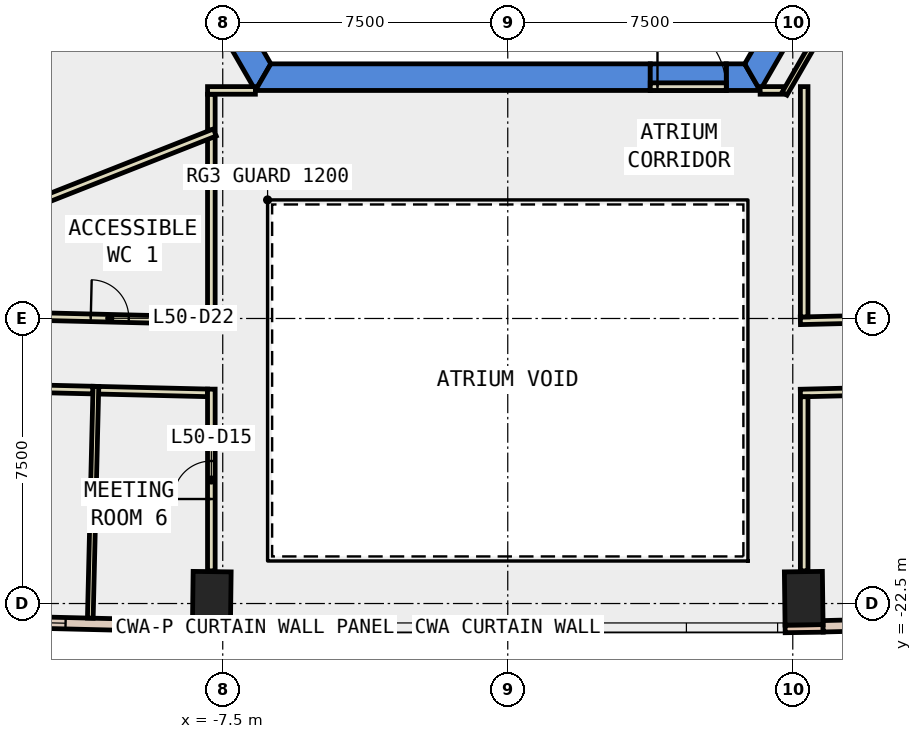
"""IFC4 building model, lengths in metres.
Left out: names, types, materials, properties, quantities, classifications, styles, units other than length and angle.
Written with IfcOpenShell. Run it as: python <this file> out.ifc"""

import sys

from ifc_helpers import new_model, si_unit, direction, frame, frame_2d, origin, origin_2d, place, context, subcontext, project, spatial, polyline, rectangle, outline, extrude, element, fill, save


model = new_model("IFC4")
c1 = context("Model", 3, precision=1e-05, world=origin(), true_north=direction((0.0, 1.0)))
c2 = subcontext(c1, "Body", "Model", "MODEL_VIEW")
j1 = project(units=[si_unit("LENGTHUNIT", "METRE"), si_unit("PLANEANGLEUNIT", "RADIAN")], contexts=[c1])
p1 = place(None, origin())
s1 = spatial("IfcSite", under=j1, at=p1, CompositionType="ELEMENT")
p2 = place(p1, origin())
s2 = spatial("IfcBuilding", under=s1, at=p2, CompositionType="ELEMENT")
p3 = place(p2, frame((0.0, 0.0, 223.4)))
s3 = spatial("IfcBuildingStorey", under=s2, at=p3, CompositionType="ELEMENT", Elevation=223.4)
for number, where, z_axis, x_axis in (
    (1, (-7.788, -22.361, -0.4), (0.0, 0.0, 1.0), (-1.0, 0.013, 0.0)),
    (2, (7.788, -22.361, -0.4), (0.0, 0.0, 1.0), (1.0, 0.013, 0.0)),
):
    element("IfcColumn", number, at=place(p3, frame(where, z_axis=z_axis, x_axis=x_axis)), inside=s3, PredefinedType="COLUMN", context=c2, shape_type="SweptSolid", body=[
        extrude(rectangle(XDim=1.0, YDim=1.4, at=origin_2d()), origin(), (0.0, 0.0, 1.0), 4.2),
    ])
p4 = place(p3, frame((0.0, 0.0, -0.4)))
e3 = element("IfcWall", 3, at=p4, inside=s3, PredefinedType="SHEAR", context=c2, shape_type="SweptSolid", body=[
    extrude(outline(polyline([(-13.279, 2.5), (-6.64, -9.0), (-6.235, -8.3), (-12.471, 2.5), (-13.279, 2.5)])), origin(), (0.0, 0.0, 1.0), 4.2),
])
p5 = place(p3, frame((0.0, 0.0, -0.4)))
e4 = element("IfcWall", 4, at=p5, inside=s3, PredefinedType="SHEAR", context=c2, shape_type="SweptSolid", body=[
    extrude(outline(polyline([(3.75, -9.0), (3.75, -8.3), (-6.235, -8.3), (-6.64, -9.0), (3.75, -9.0)])), origin(), (0.0, 0.0, 1.0), 4.2),
])
p6 = place(p3, frame((0.0, 0.0, -0.4)))
e5 = element("IfcWall", 5, at=p6, inside=s3, PredefinedType="SHEAR", context=c2, shape_type="SweptSolid", body=[
    extrude(outline(polyline([(5.75, -8.3), (5.75, -9.0), (6.64, -9.0), (6.235, -8.3), (5.75, -8.3)])), origin(), (0.0, 0.0, 1.0), 4.2),
])
p7 = place(p3, frame((0.0, 0.0, 3.6)))
e6 = element("IfcWall", 6, at=p7, inside=s3, PredefinedType="SHEAR", context=c2, shape_type="SweptSolid", body=[
    extrude(outline(polyline([(5.75, -9.0), (5.75, -8.3), (3.75, -8.3), (3.75, -9.0), (5.75, -9.0)])), origin(), (0.0, 0.0, 1.0), 0.2),
])
p8 = place(p3, frame((0.0, 0.0, -0.4)))
e7 = element("IfcWall", 7, at=p8, inside=s3, PredefinedType="SHEAR", context=c2, shape_type="SweptSolid", body=[
    extrude(outline(polyline([(6.64, -9.0), (13.279, 2.5), (12.471, 2.5), (6.235, -8.3), (6.64, -9.0)])), origin(), (0.0, 0.0, 1.0), 4.2),
])
for number, where, z_axis, x_axis in (
    (8, (8.877, -5.125, -0.4), (0.0, 0.0, 1.0), (0.866, -0.5, 0.0)),
    (9, (-8.877, -5.125, -0.4), (0.0, 0.0, 1.0), (-0.866, -0.5, 0.0)),
):
    element("IfcWall", number, at=place(p3, frame(where, z_axis=z_axis, x_axis=x_axis)), inside=s3, PredefinedType="SHEAR", context=c2, shape_type="SweptSolid", body=[
        extrude(rectangle(XDim=9.0, YDim=0.8, at=frame_2d((4.5, 0.0))), origin(), (0.0, 0.0, 1.0), 4.2),
    ])
for number, where, z_axis, x_axis in (
    (10, (-8.299, -23.154, 0.0), (0.0, 0.0, 1.0), (1.0, -0.014, 0.0)),
    (11, (7.299, -23.168, 0.0), (0.0, 0.0, 1.0), (1.0, 0.014, 0.0)),
):
    element("IfcWall", number, at=place(p3, frame(where, z_axis=z_axis, x_axis=x_axis)), inside=s3, PredefinedType="STANDARD", context=c2, shape_type="SweptSolid", body=[
        extrude(rectangle(XDim=1.0, YDim=0.2, at=frame_2d((0.5, 0.0))), origin(), (0.0, 0.0, 1.0), 3.8),
    ])
p9 = place(p3, frame((-13.681, -22.969, 0.0), z_axis=(0.0, 0.0, 1.0), x_axis=(0.999708030006, -0.024163086341, 0.0)))
e12 = element("IfcWall", 12, at=p9, inside=s3, PredefinedType="STANDARD", context=c2, shape_type="SweptSolid", body=[
    extrude(rectangle(XDim=5.385, YDim=0.3, at=frame_2d((2.693, 0.0))), origin(), (0.0, 0.0, 1.0), 3.8),
])
p10 = place(p9, frame((0.646, 0.0, 0.9)))
e13 = element("IfcOpeningElement", 13, at=p10, cuts=e12, PredefinedType="OPENING", context=c2, shape_type="SweptSolid", body=[
    extrude(rectangle(XDim=1.4, YDim=2.6, at=frame_2d((0.7, 1.3))), frame((0.0, 0.16, 0.0), z_axis=(0.0, -1.0, 0.0), x_axis=(1.0, 0.0, 0.0)), (0.0, 0.0, 1.0), 0.32),
])
p11 = place(p9, frame((3.339, 0.0, 0.9)))
e14 = element("IfcOpeningElement", 14, at=p11, cuts=e12, PredefinedType="OPENING", context=c2, shape_type="SweptSolid", body=[
    extrude(rectangle(XDim=1.4, YDim=2.6, at=frame_2d((0.7, 1.3))), frame((0.0, 0.16, 0.0), z_axis=(0.0, -1.0, 0.0), x_axis=(1.0, 0.0, 0.0)), (0.0, 0.0, 1.0), 0.32),
])
p12 = place(p3, frame((8.297, -23.099, 0.0), z_axis=(0.0, 0.0, 1.0), x_axis=(0.999708030006, 0.024163086341, 0.0)))
e15 = element("IfcWall", 15, at=p12, inside=s3, PredefinedType="STANDARD", context=c2, shape_type="SweptSolid", body=[
    extrude(rectangle(XDim=5.385, YDim=0.3, at=frame_2d((2.693, 0.0))), origin(), (0.0, 0.0, 1.0), 3.8),
])
p13 = place(p12, frame((0.646, 0.0, 0.9)))
e16 = element("IfcOpeningElement", 16, at=p13, cuts=e15, PredefinedType="OPENING", context=c2, shape_type="SweptSolid", body=[
    extrude(rectangle(XDim=1.4, YDim=2.6, at=frame_2d((0.7, 1.3))), frame((0.0, 0.16, 0.0), z_axis=(0.0, -1.0, 0.0), x_axis=(1.0, 0.0, 0.0)), (0.0, 0.0, 1.0), 0.32),
])
p14 = place(p12, frame((3.339, 0.0, 0.9)))
e17 = element("IfcOpeningElement", 17, at=p14, cuts=e15, PredefinedType="OPENING", context=c2, shape_type="SweptSolid", body=[
    extrude(rectangle(XDim=1.4, YDim=2.6, at=frame_2d((0.7, 1.3))), frame((0.0, 0.16, 0.0), z_axis=(0.0, -1.0, 0.0), x_axis=(1.0, 0.0, 0.0)), (0.0, 0.0, 1.0), 0.32),
])
p15 = place(p3, frame((7.7, -15.061, 0.0), z_axis=(0.0, 0.0, 1.0), x_axis=(0.999709615165, 0.024097413707, 0.0)))
e18 = element("IfcWall", 18, at=p15, inside=s3, PredefinedType="PARTITIONING", context=c2, shape_type="SweptSolid", body=[
    extrude(rectangle(XDim=6.231, YDim=0.2, at=frame_2d((3.115, 0.0))), origin(), (0.0, 0.0, 1.0), 3.8),
])
p16 = place(p15, frame((2.615, 0.0, 0.0)))
e19 = element("IfcOpeningElement", 19, at=p16, cuts=e18, PredefinedType="OPENING", context=c2, shape_type="SweptSolid", body=[
    extrude(rectangle(XDim=1.0, YDim=2.1, at=frame_2d((0.5, 1.05))), frame((0.0, 0.11, 0.0), z_axis=(0.0, -1.0, 0.0), x_axis=(1.0, 0.0, 0.0)), (0.0, 0.0, 1.0), 0.22),
])
p17 = place(p3, frame((-13.246, -14.927, 0.0), z_axis=(0.0, 0.0, 1.0), x_axis=(0.999708107757, -0.024159869312, 0.0)))
e20 = element("IfcWall", 20, at=p17, inside=s3, PredefinedType="PARTITIONING", context=c2, shape_type="SweptSolid", body=[
    extrude(rectangle(XDim=5.548, YDim=0.2, at=frame_2d((2.774, 0.0))), origin(), (0.0, 0.0, 1.0), 3.8),
])
p18 = place(p17, frame((2.274, 0.0, 0.0)))
e21 = element("IfcOpeningElement", 21, at=p18, cuts=e20, PredefinedType="OPENING", context=c2, shape_type="SweptSolid", body=[
    extrude(rectangle(XDim=1.0, YDim=2.1, at=frame_2d((0.5, 1.05))), frame((0.0, 0.11, 0.0), z_axis=(0.0, -1.0, 0.0), x_axis=(1.0, 0.0, 0.0)), (0.0, 0.0, 1.0), 0.22),
])
p19 = place(p3, frame((14.063, -16.808, 0.0), z_axis=(0.0, 0.0, 1.0), x_axis=(-0.999707980382, -0.024165139379, 0.0)))
e22 = element("IfcWall", 22, at=p19, inside=s3, PredefinedType="PARTITIONING", context=c2, shape_type="SweptSolid", body=[
    extrude(rectangle(XDim=6.365, YDim=0.2, at=frame_2d((3.183, 0.0))), origin(), (0.0, 0.0, 1.0), 3.8),
])
p20 = place(p19, frame((2.683, 0.0, 0.0)))
e23 = element("IfcOpeningElement", 23, at=p20, cuts=e22, PredefinedType="OPENING", context=c2, shape_type="SweptSolid", body=[
    extrude(rectangle(XDim=1.0, YDim=2.1, at=frame_2d((0.5, 1.05))), frame((0.0, 0.11, 0.0), z_axis=(0.0, -1.0, 0.0), x_axis=(1.0, 0.0, 0.0)), (0.0, 0.0, 1.0), 0.22),
])
p21 = place(p3, frame((-10.915, -16.884, 0.0), z_axis=(0.0, 0.0, 1.0), x_axis=(-0.999710384303, 0.024065483947, 0.0)))
e24 = element("IfcWall", 24, at=p21, inside=s3, PredefinedType="PARTITIONING", context=c2, shape_type="SweptSolid", body=[
    extrude(rectangle(XDim=3.074, YDim=0.2, at=frame_2d((1.537, 0.0))), origin(), (0.0, 0.0, 1.0), 3.8),
])
p22 = place(p3, frame((-7.9, -16.957, 0.0), z_axis=(0.0, 0.0, 1.0), x_axis=(-0.999709338637, 0.024108883071, 0.0)))
e25 = element("IfcWall", 25, at=p22, inside=s3, PredefinedType="PARTITIONING", context=c2, shape_type="SweptSolid", body=[
    extrude(rectangle(XDim=2.866, YDim=0.2, at=frame_2d((1.433, 0.0))), origin(), (0.0, 0.0, 1.0), 3.8),
])
p23 = place(p3, frame((6.641, -8.999, 0.0), z_axis=(0.0, 0.0, 1.0), x_axis=(1.0, 0.0, 0.0)))
e26 = element("IfcWall", 26, at=p23, inside=s3, PredefinedType="PARTITIONING", context=c2, shape_type="SweptSolid", body=[
    extrude(rectangle(XDim=0.617, YDim=0.2, at=frame_2d((0.309, 0.0))), origin(), (0.0, 0.0, 1.0), 3.8),
])
p24 = place(p3, frame((7.283, -9.086, 0.0), z_axis=(0.0, 0.0, 1.0), x_axis=(0.500035303972, 0.866005020067, 0.0)))
e27 = element("IfcWall", 27, at=p24, inside=s3, PredefinedType="PARTITIONING", context=c2, shape_type="SweptSolid", body=[
    extrude(rectangle(XDim=3.828, YDim=0.15, at=frame_2d((1.914, 0.0))), origin(), (0.0, 0.0, 1.0), 3.8),
])
p25 = place(p3, frame((7.8, -8.899, 0.0), z_axis=(0.0, 0.0, 1.0), x_axis=(0.0, -1.0, 0.0)))
e28 = element("IfcWall", 28, at=p25, inside=s3, PredefinedType="PARTITIONING", context=c2, shape_type="SweptSolid", body=[
    extrude(rectangle(XDim=6.06, YDim=0.2, at=frame_2d((3.03, 0.0))), origin(), (0.0, 0.0, 1.0), 3.8),
])
p26 = place(p3, frame((-7.8, -10.041, 0.0), z_axis=(0.0, 0.0, 1.0), x_axis=(0.0, 1.0, 0.0)))
e29 = element("IfcWall", 29, at=p26, inside=s3, PredefinedType="PARTITIONING", context=c2, shape_type="SweptSolid", body=[
    extrude(rectangle(XDim=0.942, YDim=0.2, at=frame_2d((0.471, 0.0))), origin(), (0.0, 0.0, 1.0), 3.8),
])
p27 = place(p3, frame((-7.9, -8.999, 0.0), z_axis=(0.0, 0.0, 1.0), x_axis=(1.0, 0.0, 0.0)))
e30 = element("IfcWall", 30, at=p27, inside=s3, PredefinedType="PARTITIONING", context=c2, shape_type="SweptSolid", body=[
    extrude(rectangle(XDim=1.259, YDim=0.2, at=frame_2d((0.629, 0.0))), origin(), (0.0, 0.0, 1.0), 3.8),
])
p28 = place(p3, frame((-7.8, -14.959, 0.0), z_axis=(0.0, 0.0, 1.0), x_axis=(0.0, 1.0, 0.0)))
e31 = element("IfcWall", 31, at=p28, inside=s3, PredefinedType="PARTITIONING", context=c2, shape_type="SweptSolid", body=[
    extrude(rectangle(XDim=4.718, YDim=0.2, at=frame_2d((2.359, 0.0))), origin(), (0.0, 0.0, 1.0), 3.8),
])
p29 = place(p3, frame((7.8, -17.059, 0.0), z_axis=(0.0, 0.0, 1.0), x_axis=(0.0, -1.0, 0.0)))
e32 = element("IfcWall", 32, at=p29, inside=s3, PredefinedType="PARTITIONING", context=c2, shape_type="SweptSolid", body=[
    extrude(rectangle(XDim=4.582, YDim=0.2, at=frame_2d((2.291, 0.0))), origin(), (0.0, 0.0, 1.0), 3.8),
])
p30 = place(p3, frame((-7.8, -21.641, 0.0), z_axis=(0.0, 0.0, 1.0), x_axis=(0.0, 1.0, 0.0)))
e33 = element("IfcWall", 33, at=p30, inside=s3, PredefinedType="PARTITIONING", context=c2, shape_type="SweptSolid", body=[
    extrude(rectangle(XDim=4.782, YDim=0.2, at=frame_2d((2.391, 0.0))), origin(), (0.0, 0.0, 1.0), 3.8),
])
p31 = place(p30, frame((1.891, 0.0, 0.0)))
e34 = element("IfcOpeningElement", 34, at=p31, cuts=e33, PredefinedType="OPENING", context=c2, shape_type="SweptSolid", body=[
    extrude(rectangle(XDim=1.0, YDim=2.1, at=frame_2d((0.5, 1.05))), frame((0.0, 0.11, 0.0), z_axis=(0.0, -1.0, 0.0), x_axis=(1.0, 0.0, 0.0)), (0.0, 0.0, 1.0), 0.22),
])
p32 = place(p3, frame((-7.707, -10.105, 0.0), z_axis=(0.0, 0.0, 1.0), x_axis=(-0.930316800812, -0.36675693603, 0.0)))
e35 = element("IfcWall", 35, at=p32, inside=s3, PredefinedType="PARTITIONING", context=c2, shape_type="SweptSolid", body=[
    extrude(rectangle(XDim=7.302, YDim=0.2, at=frame_2d((3.651, 0.0))), origin(), (0.0, 0.0, 1.0), 3.8),
])
p33 = place(p3, frame((-10.838, -16.786, 0.0), z_axis=(0.0, 0.0, 1.0), x_axis=(-0.024134212614, -0.999708727471, 0.0)))
e36 = element("IfcWall", 36, at=p33, inside=s3, PredefinedType="PARTITIONING", context=c2, shape_type="SweptSolid", body=[
    extrude(rectangle(XDim=6.1, YDim=0.15, at=frame_2d((3.05, 0.0))), origin(), (0.0, 0.0, 1.0), 3.8),
])
p34 = place(p3, frame((3.75, -8.9, 0.0), z_axis=(0.0, 0.0, 1.0), x_axis=(1.0, 0.0, 0.0)))
e37 = element("IfcWall", 37, at=p34, inside=s3, PredefinedType="PARTITIONING", context=c2, shape_type="SweptSolid", body=[
    extrude(rectangle(XDim=2.0, YDim=0.2, at=frame_2d((1.0, 0.0))), origin(), (0.0, 0.0, 1.0), 2.4),
])
p35 = place(p34, frame((0.19, 0.0, 0.0)))
e38 = element("IfcOpeningElement", 38, at=p35, cuts=e37, PredefinedType="OPENING", context=c2, shape_type="SweptSolid", body=[
    extrude(rectangle(XDim=1.8, YDim=2.1, at=frame_2d((0.9, 1.05))), frame((0.0, 0.11, 0.0), z_axis=(0.0, -1.0, 0.0), x_axis=(1.0, 0.0, 0.0)), (0.0, 0.0, 1.0), 0.22),
])
p36 = place(p10, origin())
e39 = element("IfcWindow", 39, at=p36, inside=s3, PartitioningType="SINGLE_PANEL", PredefinedType="WINDOW", context=c2, shape_type="SweptSolid", body=[
    extrude(rectangle(XDim=1.4, YDim=2.6, at=frame_2d((0.7, 1.3))), frame((0.0, 0.03, 0.0), z_axis=(0.0, -1.0, 0.0), x_axis=(1.0, 0.0, 0.0)), (0.0, 0.0, 1.0), 0.06),
])
fill(e13, e39)
p37 = place(p11, origin())
e40 = element("IfcWindow", 40, at=p37, inside=s3, PartitioningType="SINGLE_PANEL", PredefinedType="WINDOW", context=c2, shape_type="SweptSolid", body=[
    extrude(rectangle(XDim=1.4, YDim=2.6, at=frame_2d((0.7, 1.3))), frame((0.0, 0.03, 0.0), z_axis=(0.0, -1.0, 0.0), x_axis=(1.0, 0.0, 0.0)), (0.0, 0.0, 1.0), 0.06),
])
fill(e14, e40)
p38 = place(p31, origin())
e41 = element("IfcDoor", 41, at=p38, inside=s3, OperationType="SINGLE_SWING_LEFT", PredefinedType="DOOR", context=c2, shape_type="SweptSolid", body=[
    extrude(rectangle(XDim=1.0, YDim=2.1, at=frame_2d((0.5, 1.05))), frame((0.0, 0.025, 0.0), z_axis=(0.0, -1.0, 0.0), x_axis=(1.0, 0.0, 0.0)), (0.0, 0.0, 1.0), 0.05),
])
fill(e34, e41)
p39 = place(p18, origin())
e42 = element("IfcDoor", 42, at=p39, inside=s3, OperationType="SINGLE_SWING_LEFT", PredefinedType="DOOR", context=c2, shape_type="SweptSolid", body=[
    extrude(rectangle(XDim=1.0, YDim=2.1, at=frame_2d((0.5, 1.05))), frame((0.0, 0.025, 0.0), z_axis=(0.0, -1.0, 0.0), x_axis=(1.0, 0.0, 0.0)), (0.0, 0.0, 1.0), 0.05),
])
fill(e21, e42)
p40 = place(p35, origin())
e43 = element("IfcDoor", 43, at=p40, inside=s3, OperationType="DOUBLE_DOOR_SINGLE_SWING", PredefinedType="DOOR", context=c2, shape_type="SweptSolid", body=[
    extrude(rectangle(XDim=1.8, YDim=2.1, at=frame_2d((0.9, 1.05))), frame((0.0, 0.025, 0.0), z_axis=(0.0, -1.0, 0.0), x_axis=(1.0, 0.0, 0.0)), (0.0, 0.0, 1.0), 0.05),
])
fill(e38, e43)
save(model, sys.argv[1])
